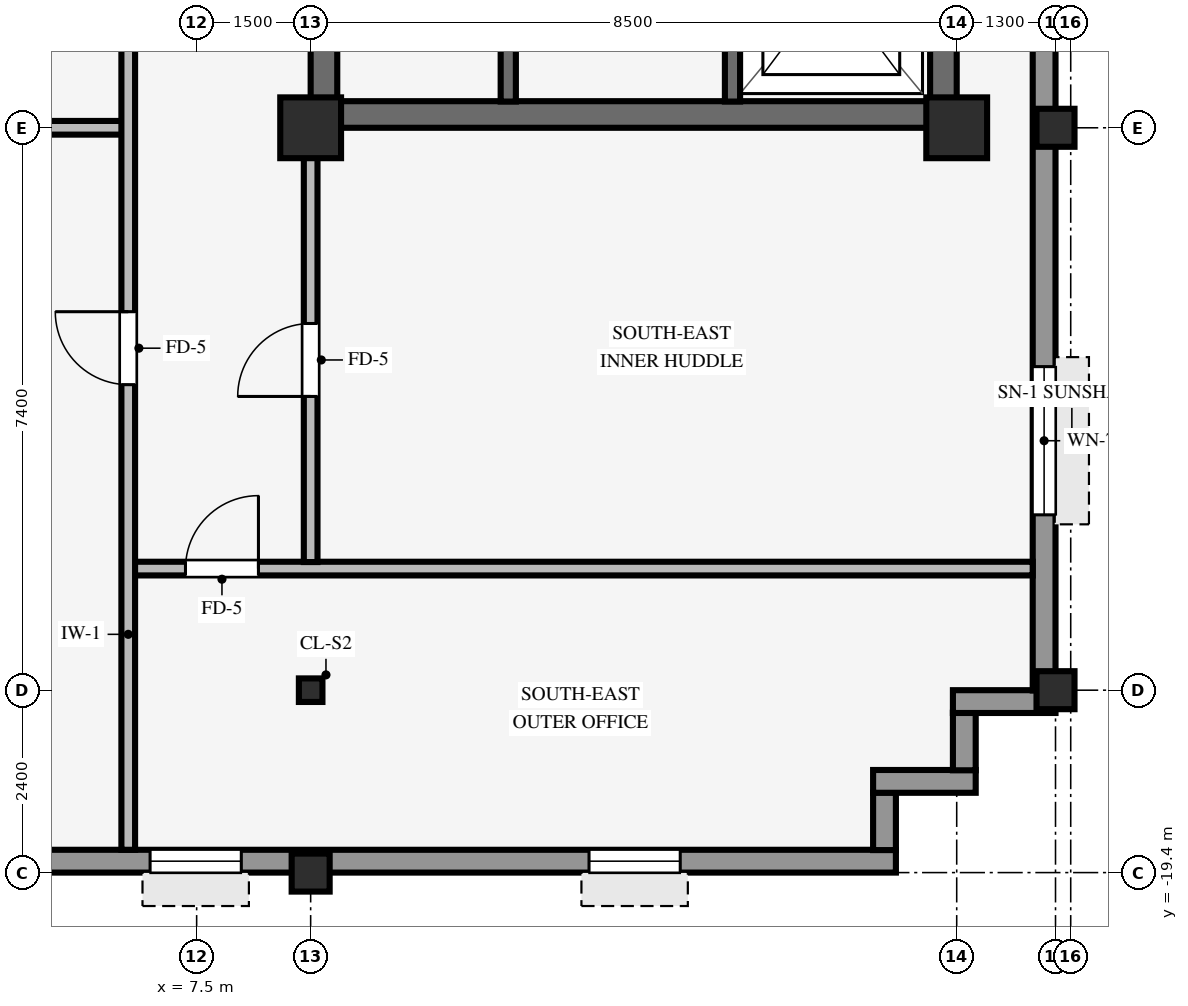
"""IFC4 building model, lengths in metres.
Left out: names, types, materials, properties, quantities, classifications, styles, units other than length and angle.
Written with IfcOpenShell. Run it as: python <this file> out.ifc"""

import sys

from ifc_helpers import new_model, si_unit, direction, frame, frame_2d, origin, origin_2d, place, context, subcontext, project, spatial, rectangle, hollow_rectangle, i_section, extrude, source, transform, mapped, element, fill, save


model = new_model("IFC4")
c1 = context("Model", 3, precision=1e-05, world=origin(), true_north=direction((0.0, 1.0)))
c2 = subcontext(c1, "Body", "Model", "MODEL_VIEW")
j1 = project(units=[si_unit("LENGTHUNIT", "METRE"), si_unit("PLANEANGLEUNIT", "RADIAN")], contexts=[c1])
p1 = place(None, origin())
s1 = spatial("IfcSite", under=j1, at=p1, CompositionType="ELEMENT")
p2 = place(p1, origin())
s2 = spatial("IfcBuilding", under=s1, at=p2, CompositionType="ELEMENT")
p3 = place(p2, frame((0.0, 0.0, 238.35)))
s3 = spatial("IfcBuildingStorey", under=s2, at=p3, CompositionType="ELEMENT", Elevation=238.35)
p4 = place(p3, frame((9.0, -9.425, 0.0), z_axis=(0.0, 0.0, 1.0), x_axis=(1.0, 0.0, 0.0)))
e1 = element("IfcWall", 1, at=p4, inside=s3, PredefinedType="SHEAR", context=c2, shape_type="SweptSolid", body=[
    extrude(rectangle(XDim=8.5, YDim=0.35, at=frame_2d((4.25, 0.0))), origin(), (0.0, 0.0, 1.0), 3.37),
])
p5 = place(p3, frame((9.175, -9.255, 0.0), z_axis=(0.0, 0.0, 1.0), x_axis=(0.0, 1.0, 0.0)))
e2 = element("IfcWall", 2, at=p5, inside=s3, PredefinedType="SHEAR", context=c2, shape_type="SweptSolid", body=[
    extrude(rectangle(XDim=18.51, YDim=0.35, at=frame_2d((9.255, 0.0))), origin(), (0.0, 0.0, 1.0), 3.37),
])
p6 = place(p5, frame((8.655, 0.0, 0.0)))
e3 = element("IfcOpeningElement", 3, at=p6, cuts=e2, PredefinedType="OPENING", context=c2, shape_type="SweptSolid", body=[
    extrude(rectangle(XDim=1.2, YDim=2.15, at=frame_2d((0.6, 1.075))), frame((0.0, 0.185, 0.0), z_axis=(0.0, -1.0, 0.0), x_axis=(1.0, 0.0, 0.0)), (0.0, 0.0, 1.0), 0.37),
])
p7 = place(p3, frame((17.325, -9.255, 0.0), z_axis=(0.0, 0.0, 1.0), x_axis=(0.0, 1.0, 0.0)))
e4 = element("IfcWall", 4, at=p7, inside=s3, PredefinedType="SHEAR", context=c2, shape_type="SweptSolid", body=[
    extrude(rectangle(XDim=18.51, YDim=0.35, at=frame_2d((9.255, 0.0))), origin(), (0.0, 0.0, 1.0), 3.37),
])
for number, where, z_axis, x_axis in (
    (5, (9.0, -9.6, 0.0), (0.0, 0.0, 1.0), (1.0, 0.0, 0.0)),
    (6, (17.5, -9.6, 0.0), (0.0, 0.0, 1.0), (1.0, 0.0, 0.0)),
):
    element("IfcColumn", number, at=place(p3, frame(where, z_axis=z_axis, x_axis=x_axis)), inside=s3, PredefinedType="COLUMN", context=c2, shape_type="SweptSolid", body=[
        extrude(rectangle(XDim=0.8, YDim=0.8, at=origin_2d()), origin(), (0.0, 0.0, 1.0), 3.37),
    ])
for number, where, z_axis, x_axis in (
    (7, (18.8, -17.0, 0.0), (0.0, 0.0, 1.0), (1.0, 0.0, 0.0)),
    (8, (18.8, -9.6, 0.0), (0.0, 0.0, 1.0), (1.0, 0.0, 0.0)),
    (9, (9.0, -19.4, 0.0), (0.0, 0.0, 1.0), (1.0, 0.0, 0.0)),
):
    element("IfcColumn", number, at=place(p3, frame(where, z_axis=z_axis, x_axis=x_axis)), inside=s3, PredefinedType="COLUMN", context=c2, shape_type="SweptSolid", body=[
        extrude(hollow_rectangle(XDim=0.5, YDim=0.5, WallThickness=0.032, InnerFilletRadius=0.032, OuterFilletRadius=0.064, at=origin_2d()), origin(), (0.0, 0.0, 1.0), 3.37),
    ])
p8 = place(p3, frame((9.0, -17.0, 0.0), z_axis=(0.0, 0.0, 1.0), x_axis=(1.0, 0.0, 0.0)))
e10 = element("IfcColumn", 10, at=p8, inside=s3, PredefinedType="COLUMN", context=c2, shape_type="SweptSolid", body=[
    extrude(i_section(OverallWidth=0.31, OverallDepth=0.31, WebThickness=0.015, FlangeThickness=0.015, FilletRadius=0.015, at=origin_2d()), origin(), (0.0, 0.0, 1.0), 3.37),
])
p9 = place(p3, frame((-24.3, -19.25, 0.0), z_axis=(0.0, 0.0, 1.0), x_axis=(1.0, 0.0, 0.0)))
e11 = element("IfcWall", 11, at=p9, inside=s3, PredefinedType="STANDARD", context=c2, shape_type="SweptSolid", body=[
    extrude(rectangle(XDim=41.0, YDim=0.3, at=frame_2d((20.5, 0.0))), origin(), (0.0, 0.0, 1.0), 2.705),
])
p10 = place(p9, frame((2.837, 0.0, 0.8)))
e12 = element("IfcOpeningElement", 12, at=p10, cuts=e11, PredefinedType="OPENING", context=c2, shape_type="SweptSolid", body=[
    extrude(rectangle(XDim=1.2, YDim=1.48, at=frame_2d((0.6, 0.74))), frame((0.0, 0.16, 0.0), z_axis=(0.0, -1.0, 0.0), x_axis=(1.0, 0.0, 0.0)), (0.0, 0.0, 1.0), 0.32),
])
p11 = place(p9, frame((7.712, 0.0, 0.8)))
e13 = element("IfcOpeningElement", 13, at=p11, cuts=e11, PredefinedType="OPENING", context=c2, shape_type="SweptSolid", body=[
    extrude(rectangle(XDim=1.2, YDim=1.48, at=frame_2d((0.6, 0.74))), frame((0.0, 0.16, 0.0), z_axis=(0.0, -1.0, 0.0), x_axis=(1.0, 0.0, 0.0)), (0.0, 0.0, 1.0), 0.32),
])
p12 = place(p9, frame((12.587, 0.0, 0.8)))
e14 = element("IfcOpeningElement", 14, at=p12, cuts=e11, PredefinedType="OPENING", context=c2, shape_type="SweptSolid", body=[
    extrude(rectangle(XDim=1.2, YDim=1.48, at=frame_2d((0.6, 0.74))), frame((0.0, 0.16, 0.0), z_axis=(0.0, -1.0, 0.0), x_axis=(1.0, 0.0, 0.0)), (0.0, 0.0, 1.0), 0.32),
])
p13 = place(p9, frame((18.363, 0.0, 0.8)))
e15 = element("IfcOpeningElement", 15, at=p13, cuts=e11, PredefinedType="OPENING", context=c2, shape_type="SweptSolid", body=[
    extrude(rectangle(XDim=1.2, YDim=1.48, at=frame_2d((0.6, 0.74))), frame((0.0, 0.16, 0.0), z_axis=(0.0, -1.0, 0.0), x_axis=(1.0, 0.0, 0.0)), (0.0, 0.0, 1.0), 0.32),
])
p14 = place(p9, frame((21.887, 0.0, 0.8)))
e16 = element("IfcOpeningElement", 16, at=p14, cuts=e11, PredefinedType="OPENING", context=c2, shape_type="SweptSolid", body=[
    extrude(rectangle(XDim=1.2, YDim=1.48, at=frame_2d((0.6, 0.74))), frame((0.0, 0.16, 0.0), z_axis=(0.0, -1.0, 0.0), x_axis=(1.0, 0.0, 0.0)), (0.0, 0.0, 1.0), 0.32),
])
p15 = place(p9, frame((27.212, 0.0, 0.8)))
e17 = element("IfcOpeningElement", 17, at=p15, cuts=e11, PredefinedType="OPENING", context=c2, shape_type="SweptSolid", body=[
    extrude(rectangle(XDim=1.2, YDim=1.48, at=frame_2d((0.6, 0.74))), frame((0.0, 0.16, 0.0), z_axis=(0.0, -1.0, 0.0), x_axis=(1.0, 0.0, 0.0)), (0.0, 0.0, 1.0), 0.32),
])
p16 = place(p9, frame((31.188, 0.0, 0.8)))
e18 = element("IfcOpeningElement", 18, at=p16, cuts=e11, PredefinedType="OPENING", context=c2, shape_type="SweptSolid", body=[
    extrude(rectangle(XDim=1.2, YDim=1.48, at=frame_2d((0.6, 0.74))), frame((0.0, 0.16, 0.0), z_axis=(0.0, -1.0, 0.0), x_axis=(1.0, 0.0, 0.0)), (0.0, 0.0, 1.0), 0.32),
])
p17 = place(p9, frame((36.962, 0.0, 0.8)))
e19 = element("IfcOpeningElement", 19, at=p17, cuts=e11, PredefinedType="OPENING", context=c2, shape_type="SweptSolid", body=[
    extrude(rectangle(XDim=1.2, YDim=1.48, at=frame_2d((0.6, 0.74))), frame((0.0, 0.16, 0.0), z_axis=(0.0, -1.0, 0.0), x_axis=(1.0, 0.0, 0.0)), (0.0, 0.0, 1.0), 0.32),
])
p18 = place(p3, frame((16.55, -19.104, 0.0), z_axis=(0.0, 0.0, 1.0), x_axis=(0.0, 1.0, 0.0)))
e20 = element("IfcWall", 20, at=p18, inside=s3, PredefinedType="STANDARD", context=c2, shape_type="SweptSolid", body=[
    extrude(rectangle(XDim=0.758, YDim=0.3, at=frame_2d((0.379, 0.0))), origin(), (0.0, 0.0, 1.0), 2.892),
])
p19 = place(p3, frame((16.4, -18.2, 0.0), z_axis=(0.0, 0.0, 1.0), x_axis=(1.0, 0.0, 0.0)))
e21 = element("IfcWall", 21, at=p19, inside=s3, PredefinedType="STANDARD", context=c2, shape_type="SweptSolid", body=[
    extrude(rectangle(XDim=1.35, YDim=0.3, at=frame_2d((0.675, 0.0))), origin(), (0.0, 0.0, 1.0), 2.892),
])
p20 = place(p3, frame((17.6, -18.054, 0.0), z_axis=(0.0, 0.0, 1.0), x_axis=(0.0, 1.0, 0.0)))
e22 = element("IfcWall", 22, at=p20, inside=s3, PredefinedType="STANDARD", context=c2, shape_type="SweptSolid", body=[
    extrude(rectangle(XDim=0.758, YDim=0.3, at=frame_2d((0.379, 0.0))), origin(), (0.0, 0.0, 1.0), 2.892),
])
p21 = place(p3, frame((17.45, -17.15, 0.0), z_axis=(0.0, 0.0, 1.0), x_axis=(1.0, 0.0, 0.0)))
e23 = element("IfcWall", 23, at=p21, inside=s3, PredefinedType="STANDARD", context=c2, shape_type="SweptSolid", body=[
    extrude(rectangle(XDim=1.35, YDim=0.3, at=frame_2d((0.675, 0.0))), origin(), (0.0, 0.0, 1.0), 2.892),
])
p22 = place(p3, frame((18.65, -17.004, 0.0), z_axis=(0.0, 0.0, 1.0), x_axis=(0.0, 1.0, 0.0)))
e24 = element("IfcWall", 24, at=p22, inside=s3, PredefinedType="STANDARD", context=c2, shape_type="SweptSolid", body=[
    extrude(rectangle(XDim=34.008, YDim=0.3, at=frame_2d((17.004, 0.0))), origin(), (0.0, 0.0, 1.0), 2.705),
])
p23 = place(p22, frame((2.311, 0.0, 0.8)))
e25 = element("IfcOpeningElement", 25, at=p23, cuts=e24, PredefinedType="OPENING", context=c2, shape_type="SweptSolid", body=[
    extrude(rectangle(XDim=1.95, YDim=1.48, at=frame_2d((0.975, 0.74))), frame((0.0, 0.16, 0.0), z_axis=(0.0, -1.0, 0.0), x_axis=(1.0, 0.0, 0.0)), (0.0, 0.0, 1.0), 0.32),
])
p24 = place(p22, frame((29.747, 0.0, 0.8)))
e26 = element("IfcOpeningElement", 26, at=p24, cuts=e24, PredefinedType="OPENING", context=c2, shape_type="SweptSolid", body=[
    extrude(rectangle(XDim=1.95, YDim=1.48, at=frame_2d((0.975, 0.74))), frame((0.0, 0.16, 0.0), z_axis=(0.0, -1.0, 0.0), x_axis=(1.0, 0.0, 0.0)), (0.0, 0.0, 1.0), 0.32),
])
p25 = place(p3, frame((14.55, -9.255, 0.0), z_axis=(0.0, 0.0, 1.0), x_axis=(0.0, 1.0, 0.0)))
e27 = element("IfcWall", 27, at=p25, inside=s3, PredefinedType="SHEAR", context=c2, shape_type="SweptSolid", body=[
    extrude(rectangle(XDim=10.16, YDim=0.2, at=frame_2d((5.08, 0.0))), origin(), (0.0, 0.0, 1.0), 3.37),
])
p26 = place(p25, frame((6.615, 0.0, 0.0)))
e28 = element("IfcOpeningElement", 28, at=p26, cuts=e27, PredefinedType="OPENING", context=c2, shape_type="SweptSolid", body=[
    extrude(rectangle(XDim=0.88, YDim=2.1, at=frame_2d((0.44, 1.05))), frame((0.0, 0.11, 0.0), z_axis=(0.0, -1.0, 0.0), x_axis=(1.0, 0.0, 0.0)), (0.0, 0.0, 1.0), 0.22),
])
p27 = place(p25, frame((0.98, 0.0, 0.0)))
e29 = element("IfcOpeningElement", 29, at=p27, cuts=e27, PredefinedType="OPENING", context=c2, shape_type="SweptSolid", body=[
    extrude(rectangle(XDim=1.15, YDim=2.15, at=frame_2d((0.575, 1.075))), frame((0.0, 0.11, 0.0), z_axis=(0.0, -1.0, 0.0), x_axis=(1.0, 0.0, 0.0)), (0.0, 0.0, 1.0), 0.22),
])
p28 = place(p3, frame((11.6, -9.255, 0.0), z_axis=(0.0, 0.0, 1.0), x_axis=(0.0, 1.0, 0.0)))
e30 = element("IfcWall", 30, at=p28, inside=s3, PredefinedType="SHEAR", context=c2, shape_type="SweptSolid", body=[
    extrude(rectangle(XDim=8.025, YDim=0.2, at=frame_2d((4.012, 0.0))), origin(), (0.0, 0.0, 1.0), 3.37),
])
p29 = place(p28, frame((5.615, 0.0, 0.0)))
e31 = element("IfcOpeningElement", 31, at=p29, cuts=e30, PredefinedType="OPENING", context=c2, shape_type="SweptSolid", body=[
    extrude(rectangle(XDim=0.88, YDim=2.1, at=frame_2d((0.44, 1.05))), frame((0.0, 0.11, 0.0), z_axis=(0.0, -1.0, 0.0), x_axis=(1.0, 0.0, 0.0)), (0.0, 0.0, 1.0), 0.22),
])
p30 = place(p3, frame((6.666, -15.4, 0.0), z_axis=(0.0, 0.0, 1.0), x_axis=(1.0, 0.0, 0.0)))
e32 = element("IfcWall", 32, at=p30, inside=s3, PredefinedType="PARTITIONING", context=c2, shape_type="SweptSolid", body=[
    extrude(rectangle(XDim=11.834, YDim=0.18, at=frame_2d((5.917, 0.0))), origin(), (0.0, 0.0, 1.0), 3.36),
])
p31 = place(p30, frame((0.687, 0.0, 0.0)))
e33 = element("IfcOpeningElement", 33, at=p31, cuts=e32, PredefinedType="OPENING", context=c2, shape_type="SweptSolid", body=[
    extrude(rectangle(XDim=0.96, YDim=2.1, at=frame_2d((0.48, 1.05))), frame((0.0, 0.1, 0.0), z_axis=(0.0, -1.0, 0.0), x_axis=(1.0, 0.0, 0.0)), (0.0, 0.0, 1.0), 0.2),
])
p32 = place(p3, frame((0.151, -9.6, 0.0), z_axis=(0.0, 0.0, 1.0), x_axis=(1.0, 0.0, 0.0)))
e34 = element("IfcWall", 34, at=p32, inside=s3, PredefinedType="PARTITIONING", context=c2, shape_type="SweptSolid", body=[
    extrude(rectangle(XDim=6.383, YDim=0.18, at=frame_2d((3.191, 0.0))), origin(), (0.0, 0.0, 1.0), 2.405),
])
p33 = place(p3, frame((6.6, -19.1, 0.0), z_axis=(0.0, 0.0, 1.0), x_axis=(0.0, 1.0, 0.0)))
e35 = element("IfcWall", 35, at=p33, inside=s3, PredefinedType="PARTITIONING", context=c2, shape_type="SweptSolid", body=[
    extrude(rectangle(XDim=17.764, YDim=0.18, at=frame_2d((8.882, 0.0))), origin(), (0.0, 0.0, 1.0), 3.36),
])
p34 = place(p33, frame((13.152, 0.0, 0.0)))
e36 = element("IfcOpeningElement", 36, at=p34, cuts=e35, PredefinedType="OPENING", context=c2, shape_type="SweptSolid", body=[
    extrude(rectangle(XDim=0.96, YDim=2.1, at=frame_2d((0.48, 1.05))), frame((0.0, 0.1, 0.0), z_axis=(0.0, -1.0, 0.0), x_axis=(1.0, 0.0, 0.0)), (0.0, 0.0, 1.0), 0.2),
])
p35 = place(p33, frame((6.12, 0.0, 0.0)))
e37 = element("IfcOpeningElement", 37, at=p35, cuts=e35, PredefinedType="OPENING", context=c2, shape_type="SweptSolid", body=[
    extrude(rectangle(XDim=0.96, YDim=2.1, at=frame_2d((0.48, 1.05))), frame((0.0, 0.1, 0.0), z_axis=(0.0, -1.0, 0.0), x_axis=(1.0, 0.0, 0.0)), (0.0, 0.0, 1.0), 0.2),
])
p36 = place(p3, frame((9.0, -15.314, 0.0), z_axis=(0.0, 0.0, 1.0), x_axis=(0.0, 1.0, 0.0)))
e38 = element("IfcWall", 38, at=p36, inside=s3, PredefinedType="PARTITIONING", context=c2, shape_type="SweptSolid", body=[
    extrude(rectangle(XDim=5.318, YDim=0.18, at=frame_2d((2.659, 0.0))), origin(), (0.0, 0.0, 1.0), 2.892),
])
p37 = place(p36, frame((2.179, 0.0, 0.0)))
e39 = element("IfcOpeningElement", 39, at=p37, cuts=e38, PredefinedType="OPENING", context=c2, shape_type="SweptSolid", body=[
    extrude(rectangle(XDim=0.96, YDim=2.1, at=frame_2d((0.48, 1.05))), frame((0.0, 0.1, 0.0), z_axis=(0.0, -1.0, 0.0), x_axis=(1.0, 0.0, 0.0)), (0.0, 0.0, 1.0), 0.2),
])
m1 = source(origin(), c2, "Body", "SweptSolid", [
    extrude(rectangle(XDim=1.2, YDim=1.48, at=frame_2d((0.6, 0.74))), frame((0.0, 0.03, 0.0), z_axis=(0.0, -1.0, 0.0), x_axis=(1.0, 0.0, 0.0)), (0.0, 0.0, 1.0), 0.06),
])
p38 = place(p16, origin())
e40 = element("IfcWindow", 40, at=p38, inside=s3, PartitioningType="SINGLE_PANEL", PredefinedType="WINDOW", context=c2, shape_type="MappedRepresentation", body=[
    mapped(m1, transform((0.0, 0.0, 0.0), scale=1.0)),
])
fill(e18, e40)
p39 = place(p17, origin())
e41 = element("IfcWindow", 41, at=p39, inside=s3, PartitioningType="SINGLE_PANEL", PredefinedType="WINDOW", context=c2, shape_type="MappedRepresentation", body=[
    mapped(m1, transform((0.0, 0.0, 0.0), scale=1.0)),
])
fill(e19, e41)
m2 = source(origin(), c2, "Body", "SweptSolid", [
    extrude(rectangle(XDim=1.95, YDim=1.48, at=frame_2d((0.975, 0.74))), frame((0.0, 0.03, 0.0), z_axis=(0.0, -1.0, 0.0), x_axis=(1.0, 0.0, 0.0)), (0.0, 0.0, 1.0), 0.06),
])
p40 = place(p23, origin())
e42 = element("IfcWindow", 42, at=p40, inside=s3, PartitioningType="SINGLE_PANEL", PredefinedType="WINDOW", context=c2, shape_type="MappedRepresentation", body=[
    mapped(m2, transform((0.0, 0.0, 0.0), scale=1.0)),
])
fill(e25, e42)
m3 = source(origin(), c2, "Body", "SweptSolid", [
    extrude(rectangle(XDim=0.96, YDim=2.1, at=frame_2d((0.48, 1.05))), frame((0.0, 0.025, 0.0), z_axis=(0.0, -1.0, 0.0), x_axis=(1.0, 0.0, 0.0)), (0.0, 0.0, 1.0), 0.05),
])
p41 = place(p35, origin())
e43 = element("IfcDoor", 43, at=p41, inside=s3, OperationType="SINGLE_SWING_RIGHT", PredefinedType="DOOR", context=c2, shape_type="MappedRepresentation", body=[
    mapped(m3, transform((0.0, 0.0, 0.0), scale=1.0)),
])
fill(e37, e43)
p42 = place(p37, origin())
e44 = element("IfcDoor", 44, at=p42, inside=s3, OperationType="SINGLE_SWING_LEFT", PredefinedType="DOOR", context=c2, shape_type="MappedRepresentation", body=[
    mapped(m3, transform((0.0, 0.0, 0.0), scale=1.0)),
])
fill(e39, e44)
p43 = place(p31, origin())
e45 = element("IfcDoor", 45, at=p43, inside=s3, OperationType="SINGLE_SWING_RIGHT", PredefinedType="DOOR", context=c2, shape_type="MappedRepresentation", body=[
    mapped(m3, transform((0.0, 0.0, 0.0), scale=1.0)),
])
fill(e33, e45)
save(model, sys.argv[1])
